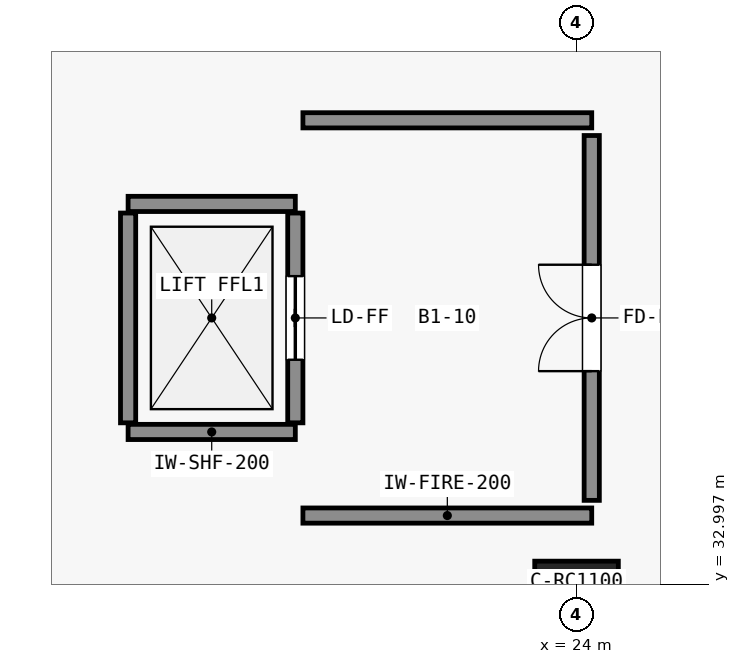
"""IFC4 building model, lengths in metres.
Left out: names, types, materials, properties, quantities, classifications, styles, units other than length and angle.
Written with IfcOpenShell. Run it as: python <this file> out.ifc"""

import sys

from ifc_helpers import new_model, si_unit, direction, frame, frame_2d, origin, origin_2d, place, context, subcontext, project, spatial, rectangle, extrude, element, fill, save


model = new_model("IFC4")
c1 = context("Model", 3, precision=1e-05, world=origin(), true_north=direction((0.0, 1.0)))
c2 = subcontext(c1, "Body", "Model", "MODEL_VIEW")
j1 = project(units=[si_unit("LENGTHUNIT", "METRE"), si_unit("PLANEANGLEUNIT", "RADIAN")], contexts=[c1])
p1 = place(None, origin())
s1 = spatial("IfcSite", under=j1, at=p1, CompositionType="ELEMENT")
p2 = place(p1, origin())
s2 = spatial("IfcBuilding", under=s1, at=p2, CompositionType="ELEMENT")
p3 = place(p2, frame((0.0, 0.0, -5.4)))
s3 = spatial("IfcBuildingStorey", under=s2, at=p3, CompositionType="ELEMENT", Elevation=-5.4)
p4 = place(p3, frame((24.0, 32.6, 0.0), z_axis=(0.0, 0.0, 1.0), x_axis=(1.0, 0.0, 0.0)))
e1 = element("IfcColumn", 1, at=p4, inside=s3, PredefinedType="COLUMN", context=c2, shape_type="SweptSolid", body=[
    extrude(rectangle(XDim=1.1, YDim=1.4, at=origin_2d()), origin(), (0.0, 0.0, 1.0), 5.4),
])
for number, where, z_axis, x_axis in (
    (2, (18.1, 35.0, 0.0), (0.0, 0.0, 1.0), (1.0, 0.0, 0.0)),
    (3, (18.1, 38.0, 0.0), (0.0, 0.0, 1.0), (1.0, 0.0, 0.0)),
):
    element("IfcWall", number, at=place(p3, frame(where, z_axis=z_axis, x_axis=x_axis)), inside=s3, PredefinedType="STANDARD", context=c2, shape_type="SweptSolid", body=[
        extrude(rectangle(XDim=2.2, YDim=0.2, at=frame_2d((1.1, 0.0))), origin(), (0.0, 0.0, 1.0), 4.96),
    ])
p5 = place(p3, frame((18.1, 35.12, 0.0), z_axis=(0.0, 0.0, 1.0), x_axis=(0.0, 1.0, 0.0)))
e4 = element("IfcWall", 4, at=p5, inside=s3, PredefinedType="STANDARD", context=c2, shape_type="SweptSolid", body=[
    extrude(rectangle(XDim=2.76, YDim=0.2, at=frame_2d((1.38, 0.0))), origin(), (0.0, 0.0, 1.0), 4.96),
])
p6 = place(p3, frame((20.3, 35.12, 0.0), z_axis=(0.0, 0.0, 1.0), x_axis=(0.0, 1.0, 0.0)))
e5 = element("IfcWall", 5, at=p6, inside=s3, PredefinedType="STANDARD", context=c2, shape_type="SweptSolid", body=[
    extrude(rectangle(XDim=2.76, YDim=0.2, at=frame_2d((1.38, 0.0))), origin(), (0.0, 0.0, 1.0), 4.96),
])
p7 = place(p6, frame((0.83, 0.0, 0.0)))
e6 = element("IfcOpeningElement", 6, at=p7, cuts=e5, PredefinedType="OPENING", context=c2, shape_type="SweptSolid", body=[
    extrude(rectangle(XDim=1.1, YDim=2.15, at=frame_2d((0.55, 1.075))), frame((0.0, 0.11, 0.0), z_axis=(0.0, -1.0, 0.0), x_axis=(1.0, 0.0, 0.0)), (0.0, 0.0, 1.0), 0.22),
])
for number, where, z_axis, x_axis in (
    (7, (20.4, 33.9, 0.0), (0.0, 0.0, 1.0), (1.0, 0.0, 0.0)),
    (8, (20.4, 39.1, 0.0), (0.0, 0.0, 1.0), (1.0, 0.0, 0.0)),
):
    element("IfcWall", number, at=place(p3, frame(where, z_axis=z_axis, x_axis=x_axis)), inside=s3, PredefinedType="STANDARD", context=c2, shape_type="SweptSolid", body=[
        extrude(rectangle(XDim=3.8, YDim=0.2, at=frame_2d((1.9, 0.0))), origin(), (0.0, 0.0, 1.0), 4.11),
    ])
p8 = place(p3, frame((24.2, 34.1, 0.0), z_axis=(0.0, 0.0, 1.0), x_axis=(0.0, 1.0, 0.0)))
e9 = element("IfcWall", 9, at=p8, inside=s3, PredefinedType="STANDARD", context=c2, shape_type="SweptSolid", body=[
    extrude(rectangle(XDim=4.8, YDim=0.2, at=frame_2d((2.4, 0.0))), origin(), (0.0, 0.0, 1.0), 4.11),
])
p9 = place(p8, frame((1.7, 0.0, 0.0)))
e10 = element("IfcOpeningElement", 10, at=p9, cuts=e9, PredefinedType="OPENING", context=c2, shape_type="SweptSolid", body=[
    extrude(rectangle(XDim=1.4, YDim=2.2, at=frame_2d((0.7, 1.1))), frame((0.0, 0.11, 0.0), z_axis=(0.0, -1.0, 0.0), x_axis=(1.0, 0.0, 0.0)), (0.0, 0.0, 1.0), 0.22),
])
p10 = place(p7, origin())
e11 = element("IfcDoor", 11, at=p10, inside=s3, OperationType="SLIDING_TO_LEFT", PredefinedType="DOOR", context=c2, shape_type="SweptSolid", body=[
    extrude(rectangle(XDim=1.1, YDim=2.15, at=frame_2d((0.55, 1.075))), frame((0.0, 0.025, 0.0), z_axis=(0.0, -1.0, 0.0), x_axis=(1.0, 0.0, 0.0)), (0.0, 0.0, 1.0), 0.05),
])
fill(e6, e11)
p11 = place(p9, origin())
e12 = element("IfcDoor", 12, at=p11, inside=s3, OperationType="DOUBLE_DOOR_SINGLE_SWING", PredefinedType="DOOR", context=c2, shape_type="SweptSolid", body=[
    extrude(rectangle(XDim=1.4, YDim=2.2, at=frame_2d((0.7, 1.1))), frame((0.0, 0.025, 0.0), z_axis=(0.0, -1.0, 0.0), x_axis=(1.0, 0.0, 0.0)), (0.0, 0.0, 1.0), 0.05),
])
fill(e10, e12)
save(model, sys.argv[1])
